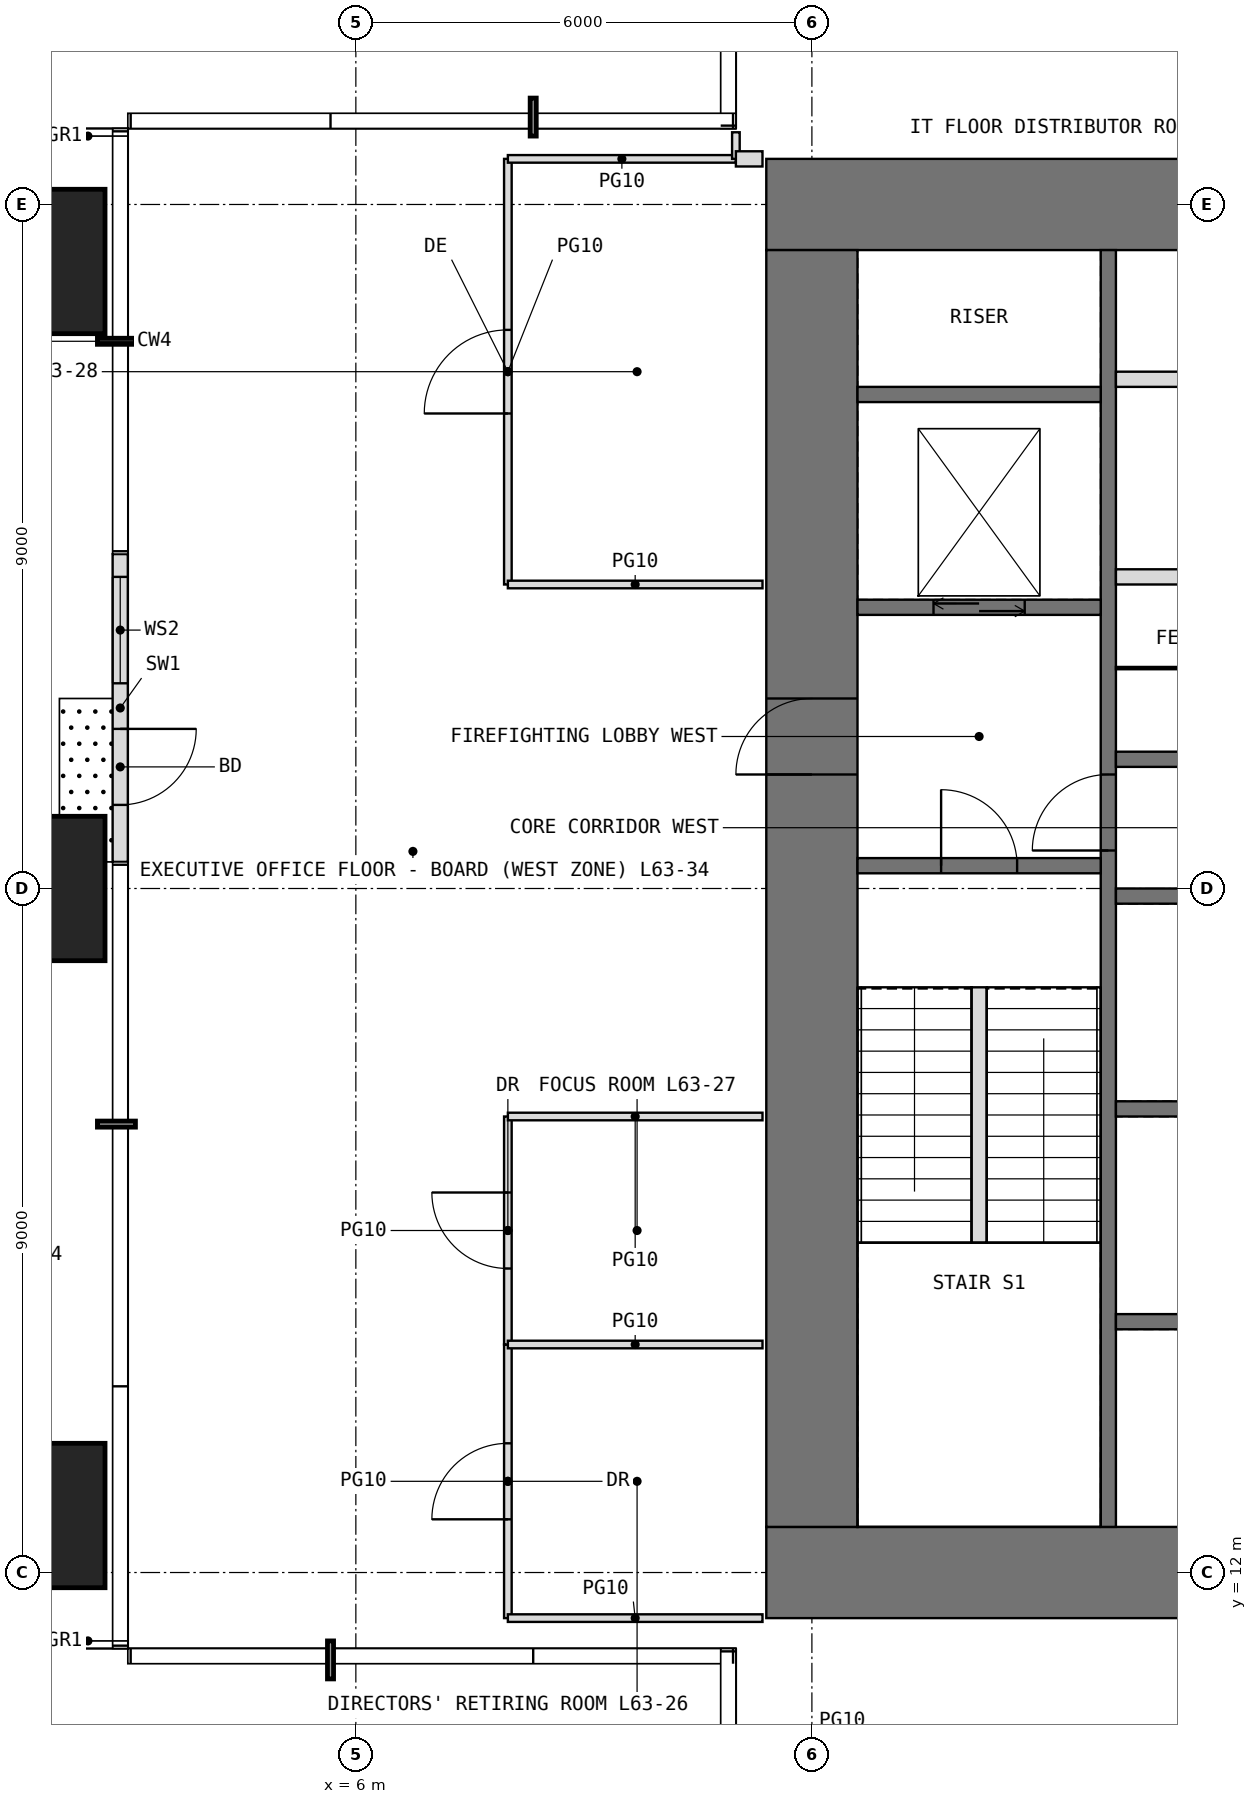
"""IFC4 building model, lengths in metres.
Left out: names, types, materials, properties, quantities, classifications, styles, units other than length and angle.
Written with IfcOpenShell. Run it as: python <this file> out.ifc"""

import sys

from ifc_helpers import new_model, si_unit, direction, frame, frame_2d, origin, origin_2d, place, context, subcontext, project, spatial, rectangle, extrude, element, fill, save


model = new_model("IFC4")
c1 = context("Model", 3, precision=1e-05, world=origin(), true_north=direction((0.0, 1.0)))
c2 = subcontext(c1, "Body", "Model", "MODEL_VIEW")
j1 = project(units=[si_unit("LENGTHUNIT", "METRE"), si_unit("PLANEANGLEUNIT", "RADIAN")], contexts=[c1])
p1 = place(None, origin())
s1 = spatial("IfcSite", under=j1, at=p1, CompositionType="ELEMENT")
p2 = place(p1, origin())
s2 = spatial("IfcBuilding", under=s1, at=p2, CompositionType="ELEMENT")
p3 = place(p2, frame((0.0, 0.0, 265.0)))
s3 = spatial("IfcBuildingStorey", under=s2, at=p3, CompositionType="ELEMENT", Elevation=265.0)
for number, where, z_axis, x_axis in (
    (1, (1.75, 12.75, 0.0), (0.0, 0.0, 1.0), (1.0, 0.0, 0.0)),
    (2, (1.75, 21.0, 0.0), (0.0, 0.0, 1.0), (1.0, 0.0, 0.0)),
    (3, (1.75, 29.25, 0.0), (0.0, 0.0, 1.0), (1.0, 0.0, 0.0)),
):
    element("IfcColumn", number, at=place(p3, frame(where, z_axis=z_axis, x_axis=x_axis)), inside=s3, PredefinedType="COLUMN", context=c2, shape_type="SweptSolid", body=[
        extrude(rectangle(XDim=1.9, YDim=1.9, at=origin_2d()), origin(), (0.0, 0.0, 1.0), 4.2),
    ])
p4 = place(p3, frame((2.9, 25.4, 0.0), z_axis=(0.0, 0.0, 1.0), x_axis=(0.0, -1.0, 0.0)))
e4 = element("IfcWall", 4, at=p4, inside=s3, PredefinedType="USERDEFINED", context=c2, shape_type="SweptSolid", body=[
    extrude(rectangle(XDim=4.05, YDim=0.2, at=frame_2d((2.025, 0.0))), origin(), (0.0, 0.0, 1.0), 3.95),
])
p5 = place(p4, frame((2.3, 0.0, 0.0)))
e5 = element("IfcOpeningElement", 5, at=p5, cuts=e4, PredefinedType="OPENING", context=c2, shape_type="SweptSolid", body=[
    extrude(rectangle(XDim=1.0, YDim=2.4, at=frame_2d((0.5, 1.2))), frame((0.0, 0.11, 0.0), z_axis=(0.0, -1.0, 0.0), x_axis=(1.0, 0.0, 0.0)), (0.0, 0.0, 1.0), 0.22),
])
p6 = place(p4, frame((0.3, 0.0, 0.3)))
e6 = element("IfcOpeningElement", 6, at=p6, cuts=e4, PredefinedType="OPENING", context=c2, shape_type="SweptSolid", body=[
    extrude(rectangle(XDim=1.4, YDim=2.7, at=frame_2d((0.7, 1.35))), frame((0.0, 0.11, 0.0), z_axis=(0.0, -1.0, 0.0), x_axis=(1.0, 0.0, 0.0)), (0.0, 0.0, 1.0), 0.22),
])
p7 = place(p3, frame((11.4, 12.0, -0.05), z_axis=(0.0, 0.0, 1.0), x_axis=(1.0, 0.0, 0.0)))
e7 = element("IfcWall", 7, at=p7, inside=s3, PredefinedType="SHEAR", context=c2, shape_type="SweptSolid", body=[
    extrude(rectangle(XDim=19.2, YDim=1.2, at=frame_2d((9.6, 0.0))), origin(), (0.0, 0.0, 1.0), 4.2),
])
p8 = place(p7, frame((8.6, 0.0, 0.05)))
e8 = element("IfcOpeningElement", 8, at=p8, cuts=e7, PredefinedType="OPENING", context=c2, shape_type="SweptSolid", body=[
    extrude(rectangle(XDim=2.0, YDim=2.2, at=frame_2d((1.0, 1.1))), frame((0.0, 0.61, 0.0), z_axis=(0.0, -1.0, 0.0), x_axis=(1.0, 0.0, 0.0)), (0.0, 0.0, 1.0), 1.22),
])
p9 = place(p3, frame((11.4, 30.0, -0.05), z_axis=(0.0, 0.0, 1.0), x_axis=(1.0, 0.0, 0.0)))
e9 = element("IfcWall", 9, at=p9, inside=s3, PredefinedType="SHEAR", context=c2, shape_type="SweptSolid", body=[
    extrude(rectangle(XDim=19.2, YDim=1.2, at=frame_2d((9.6, 0.0))), origin(), (0.0, 0.0, 1.0), 4.2),
])
p10 = place(p9, frame((8.6, 0.0, 0.05)))
e10 = element("IfcOpeningElement", 10, at=p10, cuts=e9, PredefinedType="OPENING", context=c2, shape_type="SweptSolid", body=[
    extrude(rectangle(XDim=2.0, YDim=2.2, at=frame_2d((1.0, 1.1))), frame((0.0, 0.61, 0.0), z_axis=(0.0, -1.0, 0.0), x_axis=(1.0, 0.0, 0.0)), (0.0, 0.0, 1.0), 1.22),
])
p11 = place(p3, frame((12.0, 12.6, -0.05), z_axis=(0.0, 0.0, 1.0), x_axis=(0.0, 1.0, 0.0)))
e11 = element("IfcWall", 11, at=p11, inside=s3, PredefinedType="SHEAR", context=c2, shape_type="SweptSolid", body=[
    extrude(rectangle(XDim=16.8, YDim=1.2, at=frame_2d((8.4, 0.0))), origin(), (0.0, 0.0, 1.0), 4.2),
])
p12 = place(p11, frame((9.9, 0.0, 0.05)))
e12 = element("IfcOpeningElement", 12, at=p12, cuts=e11, PredefinedType="OPENING", context=c2, shape_type="SweptSolid", body=[
    extrude(rectangle(XDim=1.0, YDim=2.2, at=frame_2d((0.5, 1.1))), frame((0.0, 0.61, 0.0), z_axis=(0.0, -1.0, 0.0), x_axis=(1.0, 0.0, 0.0)), (0.0, 0.0, 1.0), 1.22),
])
p13 = place(p3, frame((15.9, 12.6, -0.05), z_axis=(0.0, 0.0, 1.0), x_axis=(0.0, 1.0, 0.0)))
e13 = element("IfcWall", 13, at=p13, inside=s3, PredefinedType="SHEAR", context=c2, shape_type="SweptSolid", body=[
    extrude(rectangle(XDim=16.8, YDim=0.2, at=frame_2d((8.4, 0.0))), origin(), (0.0, 0.0, 1.0), 4.2),
])
p14 = place(p13, frame((8.9, 0.0, 0.05)))
e14 = element("IfcOpeningElement", 14, at=p14, cuts=e13, PredefinedType="OPENING", context=c2, shape_type="SweptSolid", body=[
    extrude(rectangle(XDim=1.0, YDim=2.2, at=frame_2d((0.5, 1.1))), frame((0.0, 0.11, 0.0), z_axis=(0.0, -1.0, 0.0), x_axis=(1.0, 0.0, 0.0)), (0.0, 0.0, 1.0), 0.22),
])
p15 = place(p3, frame((12.6, 21.3, -0.05), z_axis=(0.0, 0.0, 1.0), x_axis=(1.0, 0.0, 0.0)))
e15 = element("IfcWall", 15, at=p15, inside=s3, PredefinedType="SHEAR", context=c2, shape_type="SweptSolid", body=[
    extrude(rectangle(XDim=3.2, YDim=0.2, at=frame_2d((1.6, 0.0))), origin(), (0.0, 0.0, 1.0), 4.2),
])
p16 = place(p15, frame((1.1, 0.0, 0.05)))
e16 = element("IfcOpeningElement", 16, at=p16, cuts=e15, PredefinedType="OPENING", context=c2, shape_type="SweptSolid", body=[
    extrude(rectangle(XDim=1.0, YDim=2.2, at=frame_2d((0.5, 1.1))), frame((0.0, 0.11, 0.0), z_axis=(0.0, -1.0, 0.0), x_axis=(1.0, 0.0, 0.0)), (0.0, 0.0, 1.0), 0.22),
])
p17 = place(p3, frame((12.6, 24.7, -0.05), z_axis=(0.0, 0.0, 1.0), x_axis=(1.0, 0.0, 0.0)))
e17 = element("IfcWall", 17, at=p17, inside=s3, PredefinedType="SHEAR", context=c2, shape_type="SweptSolid", body=[
    extrude(rectangle(XDim=3.2, YDim=0.2, at=frame_2d((1.6, 0.0))), origin(), (0.0, 0.0, 1.0), 4.2),
])
p18 = place(p17, frame((1.0, 0.0, 0.05)))
e18 = element("IfcOpeningElement", 18, at=p18, cuts=e17, PredefinedType="OPENING", context=c2, shape_type="SweptSolid", body=[
    extrude(rectangle(XDim=1.2, YDim=2.2, at=frame_2d((0.6, 1.1))), frame((0.0, 0.11, 0.0), z_axis=(0.0, -1.0, 0.0), x_axis=(1.0, 0.0, 0.0)), (0.0, 0.0, 1.0), 0.22),
])
for number, where, z_axis, x_axis in (
    (19, (12.6, 27.5, -0.05), (0.0, 0.0, 1.0), (1.0, 0.0, 0.0)),
    (20, (16.0, 15.3, -0.05), (0.0, 0.0, 1.0), (1.0, 0.0, 0.0)),
    (21, (16.0, 18.1, -0.05), (0.0, 0.0, 1.0), (1.0, 0.0, 0.0)),
    (22, (16.0, 20.9, -0.05), (0.0, 0.0, 1.0), (1.0, 0.0, 0.0)),
    (23, (16.0, 22.7, -0.05), (0.0, 0.0, 1.0), (1.0, 0.0, 0.0)),
):
    element("IfcWall", number, at=place(p3, frame(where, z_axis=z_axis, x_axis=x_axis)), inside=s3, PredefinedType="SHEAR", context=c2, shape_type="SweptSolid", body=[
        extrude(rectangle(XDim=3.2, YDim=0.2, at=frame_2d((1.6, 0.0))), origin(), (0.0, 0.0, 1.0), 4.2),
    ])
for number, where, z_axis, x_axis in (
    (24, (16.0, 25.1, 0.0), (0.0, 0.0, 1.0), (1.0, 0.0, 0.0)),
    (25, (16.0, 27.7, 0.0), (0.0, 0.0, 1.0), (1.0, 0.0, 0.0)),
):
    element("IfcWall", number, at=place(p3, frame(where, z_axis=z_axis, x_axis=x_axis)), inside=s3, PredefinedType="PARTITIONING", context=c2, shape_type="SweptSolid", body=[
        extrude(rectangle(XDim=3.2, YDim=0.2, at=frame_2d((1.6, 0.0))), origin(), (0.0, 0.0, 1.0), 3.95),
    ])
p19 = place(p3, frame((16.0, 23.9, 0.0), z_axis=(0.0, 0.0, 1.0), x_axis=(1.0, 0.0, 0.0)))
e26 = element("IfcWall", 26, at=p19, inside=s3, PredefinedType="PARTITIONING", context=c2, shape_type="SweptSolid", body=[
    extrude(rectangle(XDim=1.4, YDim=0.03, at=frame_2d((0.7, 0.0))), origin(), (0.0, 0.0, 1.0), 3.95),
])
p20 = place(p3, frame((8.0, 11.4, 0.0), z_axis=(0.0, 0.0, 1.0), x_axis=(0.0, 1.0, 0.0)))
e27 = element("IfcWall", 27, at=p20, inside=s3, PredefinedType="PARTITIONING", context=c2, shape_type="SweptSolid", body=[
    extrude(rectangle(XDim=3.6, YDim=0.1, at=frame_2d((1.8, 0.0))), origin(), (0.0, 0.0, 1.0), 3.95),
])
p21 = place(p20, frame((1.3, 0.0, 0.0)))
e28 = element("IfcOpeningElement", 28, at=p21, cuts=e27, PredefinedType="OPENING", context=c2, shape_type="SweptSolid", body=[
    extrude(rectangle(XDim=1.0, YDim=2.2, at=frame_2d((0.5, 1.1))), frame((0.0, 0.06, 0.0), z_axis=(0.0, -1.0, 0.0), x_axis=(1.0, 0.0, 0.0)), (0.0, 0.0, 1.0), 0.12),
])
p22 = place(p3, frame((8.0, 11.4, 0.0), z_axis=(0.0, 0.0, 1.0), x_axis=(1.0, 0.0, 0.0)))
e29 = element("IfcWall", 29, at=p22, inside=s3, PredefinedType="PARTITIONING", context=c2, shape_type="SweptSolid", body=[
    extrude(rectangle(XDim=3.35, YDim=0.1, at=frame_2d((1.675, 0.0))), origin(), (0.0, 0.0, 1.0), 3.95),
])
p23 = place(p3, frame((8.0, 15.0, 0.0), z_axis=(0.0, 0.0, 1.0), x_axis=(0.0, 1.0, 0.0)))
e30 = element("IfcWall", 30, at=p23, inside=s3, PredefinedType="PARTITIONING", context=c2, shape_type="SweptSolid", body=[
    extrude(rectangle(XDim=3.0, YDim=0.1, at=frame_2d((1.5, 0.0))), origin(), (0.0, 0.0, 1.0), 3.95),
])
p24 = place(p23, frame((1.0, 0.0, 0.0)))
e31 = element("IfcOpeningElement", 31, at=p24, cuts=e30, PredefinedType="OPENING", context=c2, shape_type="SweptSolid", body=[
    extrude(rectangle(XDim=1.0, YDim=2.2, at=frame_2d((0.5, 1.1))), frame((0.0, 0.06, 0.0), z_axis=(0.0, -1.0, 0.0), x_axis=(1.0, 0.0, 0.0)), (0.0, 0.0, 1.0), 0.12),
])
for number, where, z_axis, x_axis in (
    (32, (8.0, 15.0, 0.0), (0.0, 0.0, 1.0), (1.0, 0.0, 0.0)),
    (33, (8.0, 18.0, 0.0), (0.0, 0.0, 1.0), (1.0, 0.0, 0.0)),
):
    element("IfcWall", number, at=place(p3, frame(where, z_axis=z_axis, x_axis=x_axis)), inside=s3, PredefinedType="PARTITIONING", context=c2, shape_type="SweptSolid", body=[
        extrude(rectangle(XDim=3.35, YDim=0.1, at=frame_2d((1.675, 0.0))), origin(), (0.0, 0.0, 1.0), 3.95),
    ])
p25 = place(p3, frame((8.0, 25.0, 0.0), z_axis=(0.0, 0.0, 1.0), x_axis=(0.0, 1.0, 0.0)))
e34 = element("IfcWall", 34, at=p25, inside=s3, PredefinedType="PARTITIONING", context=c2, shape_type="SweptSolid", body=[
    extrude(rectangle(XDim=5.6, YDim=0.1, at=frame_2d((2.8, 0.0))), origin(), (0.0, 0.0, 1.0), 3.95),
])
p26 = place(p25, frame((2.25, 0.0, 0.0)))
e35 = element("IfcOpeningElement", 35, at=p26, cuts=e34, PredefinedType="OPENING", context=c2, shape_type="SweptSolid", body=[
    extrude(rectangle(XDim=1.1, YDim=2.3, at=frame_2d((0.55, 1.15))), frame((0.0, 0.06, 0.0), z_axis=(0.0, -1.0, 0.0), x_axis=(1.0, 0.0, 0.0)), (0.0, 0.0, 1.0), 0.12),
])
p27 = place(p3, frame((8.0, 25.0, 0.0), z_axis=(0.0, 0.0, 1.0), x_axis=(1.0, 0.0, 0.0)))
e36 = element("IfcWall", 36, at=p27, inside=s3, PredefinedType="PARTITIONING", context=c2, shape_type="SweptSolid", body=[
    extrude(rectangle(XDim=3.35, YDim=0.1, at=frame_2d((1.675, 0.0))), origin(), (0.0, 0.0, 1.0), 3.95),
])
p28 = place(p3, frame((8.0, 30.6, 0.0), z_axis=(0.0, 0.0, 1.0), x_axis=(1.0, 0.0, 0.0)))
e37 = element("IfcWall", 37, at=p28, inside=s3, PredefinedType="PARTITIONING", context=c2, shape_type="SweptSolid", body=[
    extrude(rectangle(XDim=3.0, YDim=0.1, at=frame_2d((1.5, 0.0))), origin(), (0.0, 0.0, 1.0), 3.95),
])
p29 = place(p3, frame((11.0, 30.6, 0.0), z_axis=(0.0, 0.0, 1.0), x_axis=(0.0, 1.0, 0.0)))
e38 = element("IfcWall", 38, at=p29, inside=s3, PredefinedType="PARTITIONING", context=c2, shape_type="SweptSolid", body=[
    extrude(rectangle(XDim=0.35, YDim=0.1, at=frame_2d((0.175, 0.0))), origin(), (0.0, 0.0, 1.0), 3.95),
])
p30 = place(p3, frame((11.0, 30.6, 0.0), z_axis=(0.0, 0.0, 1.0), x_axis=(1.0, 0.0, 0.0)))
e39 = element("IfcWall", 39, at=p30, inside=s3, PredefinedType="PARTITIONING", context=c2, shape_type="SweptSolid", body=[
    extrude(rectangle(XDim=0.35, YDim=0.2, at=frame_2d((0.175, 0.0))), origin(), (0.0, 0.0, 1.0), 3.95),
])
p31 = place(p3, frame((14.2, 16.34, 0.0), z_axis=(0.0, 0.0, 1.0), x_axis=(0.0, 1.0, 0.0)))
e40 = element("IfcWall", 40, at=p31, inside=s3, PredefinedType="PARTITIONING", context=c2, shape_type="SweptSolid", body=[
    extrude(rectangle(XDim=3.36, YDim=0.2, at=frame_2d((1.68, 0.0))), origin(), (0.0, 0.0, 1.0), 4.2),
])
p32 = place(p5, origin())
e41 = element("IfcDoor", 41, at=p32, inside=s3, OperationType="SINGLE_SWING_LEFT", PredefinedType="DOOR", context=c2, shape_type="SweptSolid", body=[
    extrude(rectangle(XDim=1.0, YDim=2.4, at=frame_2d((0.5, 1.2))), frame((0.0, 0.025, 0.0), z_axis=(0.0, -1.0, 0.0), x_axis=(1.0, 0.0, 0.0)), (0.0, 0.0, 1.0), 0.05),
])
fill(e5, e41)
p33 = place(p6, origin())
e42 = element("IfcWindow", 42, at=p33, inside=s3, PartitioningType="SINGLE_PANEL", PredefinedType="WINDOW", context=c2, shape_type="SweptSolid", body=[
    extrude(rectangle(XDim=1.4, YDim=2.7, at=frame_2d((0.7, 1.35))), frame((0.0, 0.03, 0.0), z_axis=(0.0, -1.0, 0.0), x_axis=(1.0, 0.0, 0.0)), (0.0, 0.0, 1.0), 0.06),
])
fill(e6, e42)
p34 = place(p12, origin())
e43 = element("IfcDoor", 43, at=p34, inside=s3, OperationType="SINGLE_SWING_LEFT", PredefinedType="DOOR", context=c2, shape_type="SweptSolid", body=[
    extrude(rectangle(XDim=1.0, YDim=2.2, at=frame_2d((0.5, 1.1))), frame((0.0, 0.025, 0.0), z_axis=(0.0, -1.0, 0.0), x_axis=(1.0, 0.0, 0.0)), (0.0, 0.0, 1.0), 0.05),
])
fill(e12, e43)
p35 = place(p16, origin())
e44 = element("IfcDoor", 44, at=p35, inside=s3, OperationType="SINGLE_SWING_LEFT", PredefinedType="DOOR", context=c2, shape_type="SweptSolid", body=[
    extrude(rectangle(XDim=1.0, YDim=2.2, at=frame_2d((0.5, 1.1))), frame((0.0, 0.025, 0.0), z_axis=(0.0, -1.0, 0.0), x_axis=(1.0, 0.0, 0.0)), (0.0, 0.0, 1.0), 0.05),
])
fill(e16, e44)
p36 = place(p14, origin())
e45 = element("IfcDoor", 45, at=p36, inside=s3, OperationType="SINGLE_SWING_LEFT", PredefinedType="DOOR", context=c2, shape_type="SweptSolid", body=[
    extrude(rectangle(XDim=1.0, YDim=2.2, at=frame_2d((0.5, 1.1))), frame((0.0, 0.025, 0.0), z_axis=(0.0, -1.0, 0.0), x_axis=(1.0, 0.0, 0.0)), (0.0, 0.0, 1.0), 0.05),
])
fill(e14, e45)
p37 = place(p21, origin())
e46 = element("IfcDoor", 46, at=p37, inside=s3, OperationType="SINGLE_SWING_LEFT", PredefinedType="DOOR", context=c2, shape_type="SweptSolid", body=[
    extrude(rectangle(XDim=1.0, YDim=2.2, at=frame_2d((0.5, 1.1))), frame((0.0, 0.025, 0.0), z_axis=(0.0, -1.0, 0.0), x_axis=(1.0, 0.0, 0.0)), (0.0, 0.0, 1.0), 0.05),
])
fill(e28, e46)
p38 = place(p24, origin())
e47 = element("IfcDoor", 47, at=p38, inside=s3, OperationType="SINGLE_SWING_RIGHT", PredefinedType="DOOR", context=c2, shape_type="SweptSolid", body=[
    extrude(rectangle(XDim=1.0, YDim=2.2, at=frame_2d((0.5, 1.1))), frame((0.0, 0.025, 0.0), z_axis=(0.0, -1.0, 0.0), x_axis=(1.0, 0.0, 0.0)), (0.0, 0.0, 1.0), 0.05),
])
fill(e31, e47)
p39 = place(p26, origin())
e48 = element("IfcDoor", 48, at=p39, inside=s3, OperationType="SINGLE_SWING_LEFT", PredefinedType="DOOR", context=c2, shape_type="SweptSolid", body=[
    extrude(rectangle(XDim=1.1, YDim=2.3, at=frame_2d((0.55, 1.15))), frame((0.0, 0.025, 0.0), z_axis=(0.0, -1.0, 0.0), x_axis=(1.0, 0.0, 0.0)), (0.0, 0.0, 1.0), 0.05),
])
fill(e35, e48)
p40 = place(p18, origin())
e49 = element("IfcDoor", 49, at=p40, inside=s3, OperationType="DOUBLE_DOOR_SLIDING", PredefinedType="DOOR", context=c2, shape_type="SweptSolid", body=[
    extrude(rectangle(XDim=1.2, YDim=2.2, at=frame_2d((0.6, 1.1))), frame((0.0, 0.025, 0.0), z_axis=(0.0, -1.0, 0.0), x_axis=(1.0, 0.0, 0.0)), (0.0, 0.0, 1.0), 0.05),
])
fill(e18, e49)
save(model, sys.argv[1])
